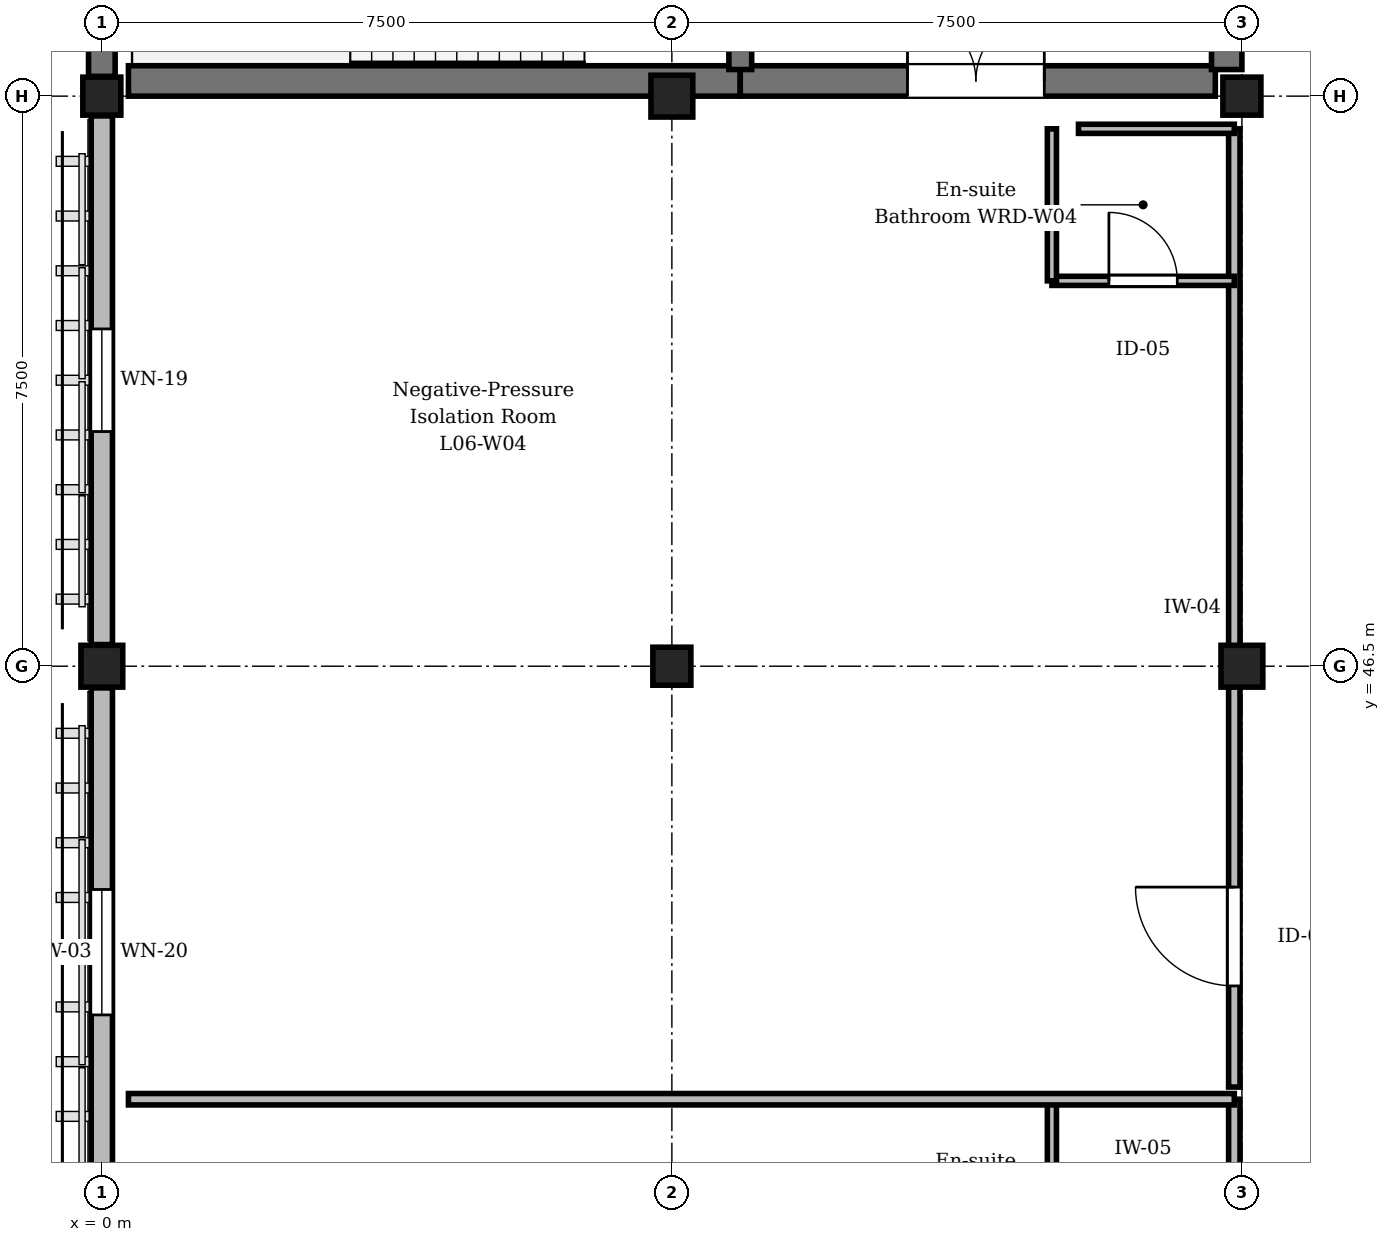
"""IFC4 building model, lengths in metres.
Left out: names, types, materials, properties, quantities, classifications, styles, units other than length and angle.
Written with IfcOpenShell. Run it as: python <this file> out.ifc"""

import sys

from ifc_helpers import new_model, si_unit, direction, frame, frame_2d, origin, origin_2d, place, context, subcontext, project, spatial, rectangle, extrude, element, fill, save


model = new_model("IFC4")
c1 = context("Model", 3, precision=1e-05, world=origin(), true_north=direction((0.0, 1.0)))
c2 = subcontext(c1, "Body", "Model", "MODEL_VIEW")
j1 = project(units=[si_unit("LENGTHUNIT", "METRE"), si_unit("PLANEANGLEUNIT", "RADIAN")], contexts=[c1])
p1 = place(None, origin())
s1 = spatial("IfcSite", under=j1, at=p1, CompositionType="ELEMENT")
p2 = place(p1, origin())
s2 = spatial("IfcBuilding", under=s1, at=p2, CompositionType="ELEMENT")
p3 = place(p2, frame((0.0, 0.0, 25.95)))
s3 = spatial("IfcBuildingStorey", under=s2, at=p3, CompositionType="ELEMENT", Elevation=25.95)
p4 = place(p3, frame((0.0, 46.5, 0.0), z_axis=(0.0, 0.0, 1.0), x_axis=(1.0, 0.0, 0.0)))
e1 = element("IfcColumn", 1, at=p4, inside=s3, PredefinedType="COLUMN", context=c2, shape_type="SweptSolid", body=[
    extrude(rectangle(XDim=0.55, YDim=0.55, at=origin_2d()), origin(), (0.0, 0.0, 1.0), 4.05),
])
for number, where, z_axis, x_axis in (
    (2, (0.0, 54.0, 0.0), (0.0, 0.0, 1.0), (1.0, 0.0, 0.0)),
    (3, (7.5, 46.5, 0.0), (0.0, 0.0, 1.0), (1.0, 0.0, 0.0)),
):
    element("IfcColumn", number, at=place(p3, frame(where, z_axis=z_axis, x_axis=x_axis)), inside=s3, PredefinedType="COLUMN", context=c2, shape_type="SweptSolid", body=[
        extrude(rectangle(XDim=0.5, YDim=0.5, at=origin_2d()), origin(), (0.0, 0.0, 1.0), 4.05),
    ])
for number, where, z_axis, x_axis in (
    (4, (7.5, 54.0, 0.0), (0.0, 0.0, 1.0), (1.0, 0.0, 0.0)),
    (5, (15.0, 46.5, 0.0), (0.0, 0.0, 1.0), (1.0, 0.0, 0.0)),
):
    element("IfcColumn", number, at=place(p3, frame(where, z_axis=z_axis, x_axis=x_axis)), inside=s3, PredefinedType="COLUMN", context=c2, shape_type="SweptSolid", body=[
        extrude(rectangle(XDim=0.55, YDim=0.55, at=origin_2d()), origin(), (0.0, 0.0, 1.0), 4.05),
    ])
p5 = place(p3, frame((15.0, 54.0, 0.0), z_axis=(0.0, 0.0, 1.0), x_axis=(1.0, 0.0, 0.0)))
e6 = element("IfcColumn", 6, at=p5, inside=s3, PredefinedType="COLUMN", context=c2, shape_type="SweptSolid", body=[
    extrude(rectangle(XDim=0.5, YDim=0.5, at=origin_2d()), origin(), (0.0, 0.0, 1.0), 4.05),
])
p6 = place(p3, frame((0.0, 39.26, 0.0), z_axis=(0.0, 0.0, 1.0), x_axis=(0.0, 1.0, 0.0)))
e7 = element("IfcWall", 7, at=p6, inside=s3, PredefinedType="STANDARD", context=c2, shape_type="SweptSolid", body=[
    extrude(rectangle(XDim=6.955, YDim=0.28, at=frame_2d((3.478, 0.0))), origin(), (0.0, 0.0, 1.0), 3.17),
])
p7 = place(p6, frame((2.653, 0.0, 0.85)))
e8 = element("IfcOpeningElement", 8, at=p7, cuts=e7, PredefinedType="OPENING", context=c2, shape_type="SweptSolid", body=[
    extrude(rectangle(XDim=1.65, YDim=2.04, at=frame_2d((0.825, 1.02))), frame((0.0, 0.15, 0.0), z_axis=(0.0, -1.0, 0.0), x_axis=(1.0, 0.0, 0.0)), (0.0, 0.0, 1.0), 0.3),
])
p8 = place(p3, frame((0.0, 46.785, 0.0), z_axis=(0.0, 0.0, 1.0), x_axis=(0.0, 1.0, 0.0)))
e9 = element("IfcWall", 9, at=p8, inside=s3, PredefinedType="STANDARD", context=c2, shape_type="SweptSolid", body=[
    extrude(rectangle(XDim=6.955, YDim=0.28, at=frame_2d((3.478, 0.0))), origin(), (0.0, 0.0, 1.0), 3.17),
])
p9 = place(p8, frame((2.802, 0.0, 0.85)))
e10 = element("IfcOpeningElement", 10, at=p9, cuts=e9, PredefinedType="OPENING", context=c2, shape_type="SweptSolid", body=[
    extrude(rectangle(XDim=1.35, YDim=2.04, at=frame_2d((0.675, 1.02))), frame((0.0, 0.15, 0.0), z_axis=(0.0, -1.0, 0.0), x_axis=(1.0, 0.0, 0.0)), (0.0, 0.0, 1.0), 0.3),
])
p10 = place(p3, frame((0.0, 54.26, 0.0), z_axis=(0.0, 0.0, 1.0), x_axis=(0.0, 1.0, 0.0)))
e11 = element("IfcWall", 11, at=p10, inside=s3, PredefinedType="SHEAR", context=c2, shape_type="SweptSolid", body=[
    extrude(rectangle(XDim=6.955, YDim=0.35, at=frame_2d((3.478, 0.0))), origin(), (0.0, 0.0, 1.0), 3.77),
])
p11 = place(p3, frame((0.35, 54.2, 0.0), z_axis=(0.0, 0.0, 1.0), x_axis=(1.0, 0.0, 0.0)))
e12 = element("IfcWall", 12, at=p11, inside=s3, PredefinedType="SHEAR", context=c2, shape_type="SweptSolid", body=[
    extrude(rectangle(XDim=8.05, YDim=0.4, at=frame_2d((4.025, 0.0))), origin(), (0.0, 0.0, 1.0), 3.77),
])
p12 = place(p3, frame((8.4, 54.2, 0.0), z_axis=(0.0, 0.0, 1.0), x_axis=(1.0, 0.0, 0.0)))
e13 = element("IfcWall", 13, at=p12, inside=s3, PredefinedType="SHEAR", context=c2, shape_type="SweptSolid", body=[
    extrude(rectangle(XDim=6.25, YDim=0.4, at=frame_2d((3.125, 0.0))), origin(), (0.0, 0.0, 1.0), 3.77),
])
p13 = place(p12, frame((2.2, 0.0, 0.0)))
e14 = element("IfcOpeningElement", 14, at=p13, cuts=e13, PredefinedType="OPENING", context=c2, shape_type="SweptSolid", body=[
    extrude(rectangle(XDim=1.8, YDim=2.25, at=frame_2d((0.9, 1.125))), frame((0.0, 0.21, 0.0), z_axis=(0.0, -1.0, 0.0), x_axis=(1.0, 0.0, 0.0)), (0.0, 0.0, 1.0), 0.42),
])
p14 = place(p3, frame((14.8, 54.35, 0.0), z_axis=(0.0, 0.0, 1.0), x_axis=(0.0, 1.0, 0.0)))
e15 = element("IfcWall", 15, at=p14, inside=s3, PredefinedType="SHEAR", context=c2, shape_type="SweptSolid", body=[
    extrude(rectangle(XDim=3.75, YDim=0.4, at=frame_2d((1.875, 0.0))), origin(), (0.0, 0.0, 1.0), 3.77),
])
p15 = place(p3, frame((8.4, 58.0, 0.0), z_axis=(0.0, 0.0, 1.0), x_axis=(0.0, -1.0, 0.0)))
e16 = element("IfcWall", 16, at=p15, inside=s3, PredefinedType="SHEAR", context=c2, shape_type="SweptSolid", body=[
    extrude(rectangle(XDim=3.65, YDim=0.3, at=frame_2d((1.825, 0.0))), origin(), (0.0, 0.0, 1.0), 3.77),
])
p16 = place(p15, frame((1.22, 0.0, 0.0)))
e17 = element("IfcOpeningElement", 17, at=p16, cuts=e16, PredefinedType="OPENING", context=c2, shape_type="SweptSolid", body=[
    extrude(rectangle(XDim=1.2, YDim=2.25, at=frame_2d((0.6, 1.125))), frame((0.0, 0.16, 0.0), z_axis=(0.0, -1.0, 0.0), x_axis=(1.0, 0.0, 0.0)), (0.0, 0.0, 1.0), 0.32),
])
p17 = place(p3, frame((14.9, 28.197, 0.0), z_axis=(0.0, 0.0, 1.0), x_axis=(0.0, 1.0, 0.0)))
e18 = element("IfcWall", 18, at=p17, inside=s3, PredefinedType="PARTITIONING", context=c2, shape_type="SweptSolid", body=[
    extrude(rectangle(XDim=12.606, YDim=0.15, at=frame_2d((6.303, 0.0))), origin(), (0.0, 0.0, 1.0), 3.055),
])
p18 = place(p17, frame((6.704, 0.0, 0.0)))
e19 = element("IfcOpeningElement", 19, at=p18, cuts=e18, PredefinedType="OPENING", context=c2, shape_type="SweptSolid", body=[
    extrude(rectangle(XDim=1.35, YDim=2.25, at=frame_2d((0.675, 1.125))), frame((0.0, 0.085, 0.0), z_axis=(0.0, -1.0, 0.0), x_axis=(1.0, 0.0, 0.0)), (0.0, 0.0, 1.0), 0.17),
])
p19 = place(p3, frame((12.5, 38.803, 0.0), z_axis=(0.0, 0.0, 1.0), x_axis=(0.0, 1.0, 0.0)))
e20 = element("IfcWall", 20, at=p19, inside=s3, PredefinedType="PARTITIONING", context=c2, shape_type="SweptSolid", body=[
    extrude(rectangle(XDim=2.0, YDim=0.12, at=frame_2d((1.0, 0.0))), origin(), (0.0, 0.0, 1.0), 3.755),
])
p20 = place(p3, frame((14.9, 40.963, 0.0), z_axis=(0.0, 0.0, 1.0), x_axis=(0.0, 1.0, 0.0)))
e21 = element("IfcWall", 21, at=p20, inside=s3, PredefinedType="PARTITIONING", context=c2, shape_type="SweptSolid", body=[
    extrude(rectangle(XDim=12.607, YDim=0.15, at=frame_2d((6.303, 0.0))), origin(), (0.0, 0.0, 1.0), 3.205),
])
p21 = place(p20, frame((1.331, 0.0, 0.0)))
e22 = element("IfcOpeningElement", 22, at=p21, cuts=e21, PredefinedType="OPENING", context=c2, shape_type="SweptSolid", body=[
    extrude(rectangle(XDim=1.3, YDim=2.2, at=frame_2d((0.65, 1.1))), frame((0.0, 0.085, 0.0), z_axis=(0.0, -1.0, 0.0), x_axis=(1.0, 0.0, 0.0)), (0.0, 0.0, 1.0), 0.17),
])
p22 = place(p3, frame((12.5, 51.57, 0.0), z_axis=(0.0, 0.0, 1.0), x_axis=(1.0, 0.0, 0.0)))
e23 = element("IfcWall", 23, at=p22, inside=s3, PredefinedType="PARTITIONING", context=c2, shape_type="SweptSolid", body=[
    extrude(rectangle(XDim=2.4, YDim=0.12, at=frame_2d((1.2, 0.0))), origin(), (0.0, 0.0, 1.0), 3.755),
])
p23 = place(p22, frame((0.75, 0.0, 0.0)))
e24 = element("IfcOpeningElement", 24, at=p23, cuts=e23, PredefinedType="OPENING", context=c2, shape_type="SweptSolid", body=[
    extrude(rectangle(XDim=0.9, YDim=2.1, at=frame_2d((0.45, 1.05))), frame((0.0, 0.07, 0.0), z_axis=(0.0, -1.0, 0.0), x_axis=(1.0, 0.0, 0.0)), (0.0, 0.0, 1.0), 0.14),
])
p24 = place(p3, frame((12.5, 51.57, 0.0), z_axis=(0.0, 0.0, 1.0), x_axis=(0.0, 1.0, 0.0)))
e25 = element("IfcWall", 25, at=p24, inside=s3, PredefinedType="PARTITIONING", context=c2, shape_type="SweptSolid", body=[
    extrude(rectangle(XDim=2.0, YDim=0.12, at=frame_2d((1.0, 0.0))), origin(), (0.0, 0.0, 1.0), 3.755),
])
p25 = place(p3, frame((0.35, 40.803, 0.0), z_axis=(0.0, 0.0, 1.0), x_axis=(1.0, 0.0, 0.0)))
e26 = element("IfcWall", 26, at=p25, inside=s3, PredefinedType="PARTITIONING", context=c2, shape_type="SweptSolid", body=[
    extrude(rectangle(XDim=14.55, YDim=0.15, at=frame_2d((7.275, 0.0))), origin(), (0.0, 0.0, 1.0), 3.755),
])
p26 = place(p3, frame((12.85, 53.57, 0.0), z_axis=(0.0, 0.0, 1.0), x_axis=(1.0, 0.0, 0.0)))
e27 = element("IfcWall", 27, at=p26, inside=s3, PredefinedType="PARTITIONING", context=c2, shape_type="SweptSolid", body=[
    extrude(rectangle(XDim=2.05, YDim=0.12, at=frame_2d((1.025, 0.0))), origin(), (0.0, 0.0, 1.0), 3.755),
])
p27 = place(p7, origin())
e28 = element("IfcWindow", 28, at=p27, inside=s3, PartitioningType="SINGLE_PANEL", PredefinedType="WINDOW", context=c2, shape_type="SweptSolid", body=[
    extrude(rectangle(XDim=1.65, YDim=2.04, at=frame_2d((0.825, 1.02))), frame((0.0, 0.03, 0.0), z_axis=(0.0, -1.0, 0.0), x_axis=(1.0, 0.0, 0.0)), (0.0, 0.0, 1.0), 0.06),
])
fill(e8, e28)
p28 = place(p9, origin())
e29 = element("IfcWindow", 29, at=p28, inside=s3, PartitioningType="SINGLE_PANEL", PredefinedType="WINDOW", context=c2, shape_type="SweptSolid", body=[
    extrude(rectangle(XDim=1.35, YDim=2.04, at=frame_2d((0.675, 1.02))), frame((0.0, 0.03, 0.0), z_axis=(0.0, -1.0, 0.0), x_axis=(1.0, 0.0, 0.0)), (0.0, 0.0, 1.0), 0.06),
])
fill(e10, e29)
p29 = place(p13, origin())
e30 = element("IfcDoor", 30, at=p29, inside=s3, OperationType="DOUBLE_DOOR_SINGLE_SWING", PredefinedType="DOOR", context=c2, shape_type="SweptSolid", body=[
    extrude(rectangle(XDim=1.8, YDim=2.25, at=frame_2d((0.9, 1.125))), frame((0.0, 0.025, 0.0), z_axis=(0.0, -1.0, 0.0), x_axis=(1.0, 0.0, 0.0)), (0.0, 0.0, 1.0), 0.05),
])
fill(e14, e30)
p30 = place(p21, origin())
e31 = element("IfcDoor", 31, at=p30, inside=s3, OperationType="SINGLE_SWING_RIGHT", PredefinedType="DOOR", context=c2, shape_type="SweptSolid", body=[
    extrude(rectangle(XDim=1.3, YDim=2.2, at=frame_2d((0.65, 1.1))), frame((0.0, 0.025, 0.0), z_axis=(0.0, -1.0, 0.0), x_axis=(1.0, 0.0, 0.0)), (0.0, 0.0, 1.0), 0.05),
])
fill(e22, e31)
p31 = place(p23, origin())
e32 = element("IfcDoor", 32, at=p31, inside=s3, OperationType="SINGLE_SWING_LEFT", PredefinedType="DOOR", context=c2, shape_type="SweptSolid", body=[
    extrude(rectangle(XDim=0.9, YDim=2.1, at=frame_2d((0.45, 1.05))), frame((0.0, 0.025, 0.0), z_axis=(0.0, -1.0, 0.0), x_axis=(1.0, 0.0, 0.0)), (0.0, 0.0, 1.0), 0.05),
])
fill(e24, e32)
save(model, sys.argv[1])
